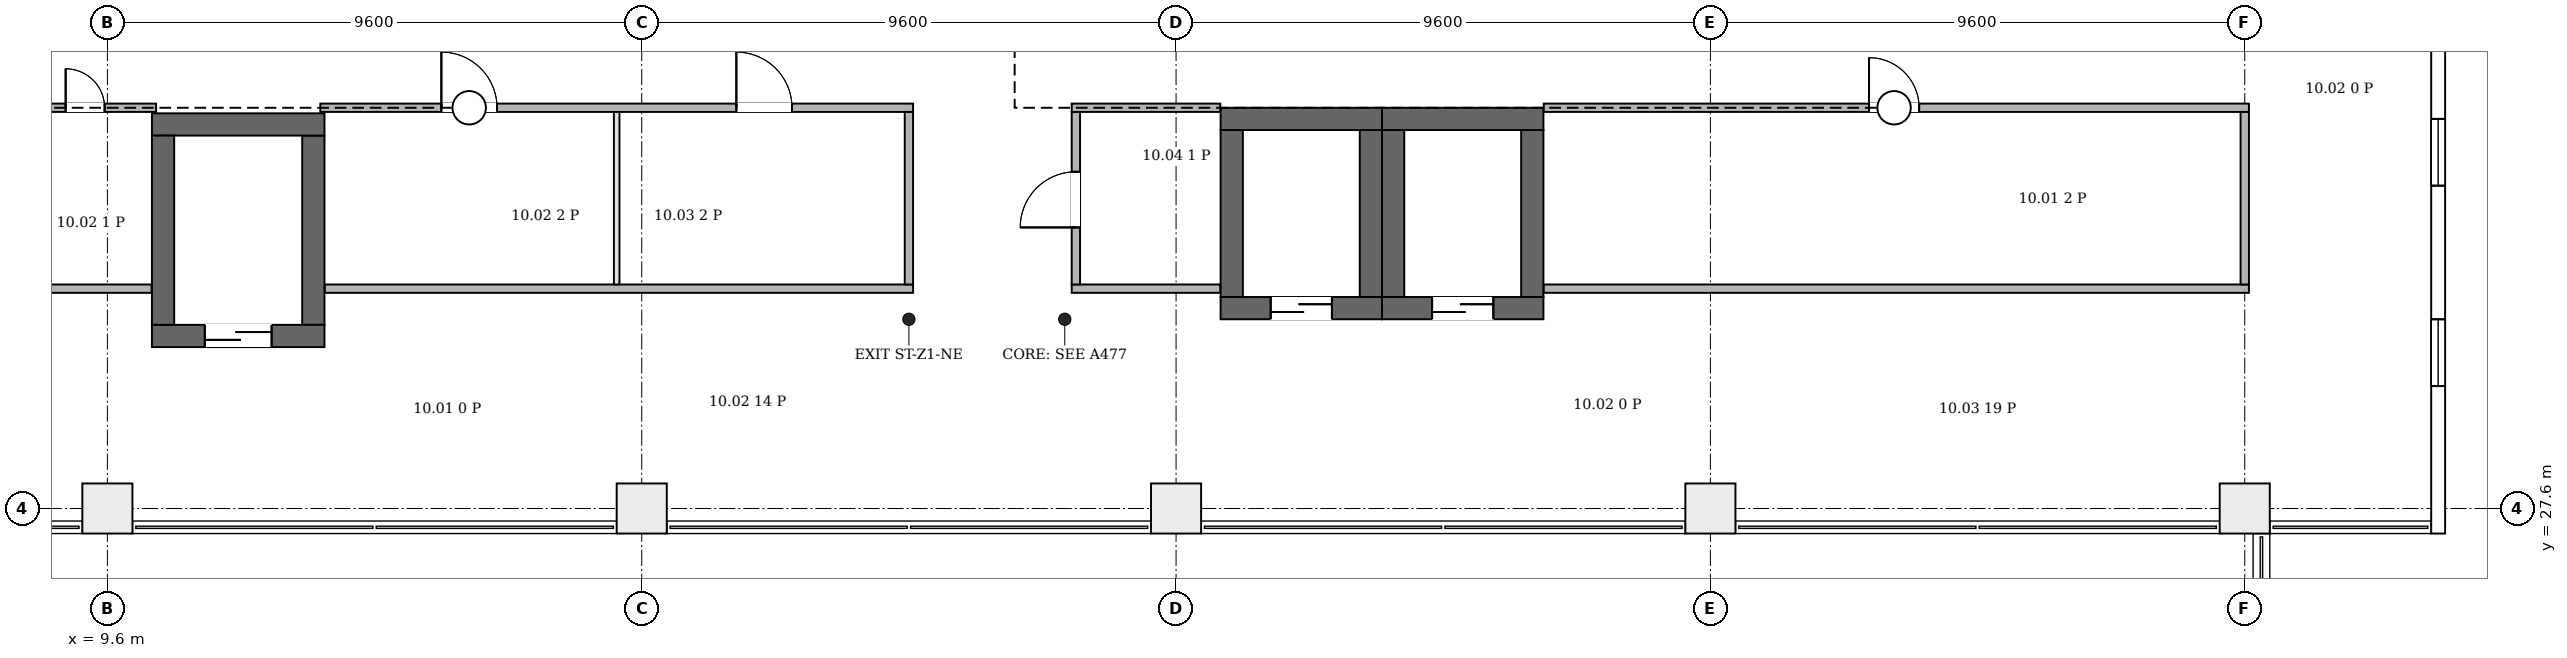
"""IFC4 building model, lengths in metres.
Left out: names, types, materials, properties, quantities, classifications, styles, units other than length and angle.
Written with IfcOpenShell. Run it as: python <this file> out.ifc"""

import sys

from ifc_helpers import new_model, si_unit, direction, frame, frame_2d, origin, origin_2d, place, context, subcontext, project, spatial, rectangle, extrude, element, fill, save


model = new_model("IFC4")
c1 = context("Model", 3, precision=1e-05, world=origin(), true_north=direction((0.0, 1.0)))
c2 = subcontext(c1, "Body", "Model", "MODEL_VIEW")
j1 = project(units=[si_unit("LENGTHUNIT", "METRE"), si_unit("PLANEANGLEUNIT", "RADIAN")], contexts=[c1])
p1 = place(None, origin())
s1 = spatial("IfcSite", under=j1, at=p1, CompositionType="ELEMENT")
p2 = place(p1, origin())
s2 = spatial("IfcBuilding", under=s1, at=p2, CompositionType="ELEMENT")
p3 = place(p2, frame((0.0, 0.0, 52.9)))
s3 = spatial("IfcBuildingStorey", under=s2, at=p3, CompositionType="ELEMENT", Elevation=52.9)
p4 = place(p3, frame((10.4, 30.7, 0.0), z_axis=(0.0, 0.0, 1.0), x_axis=(1.0, 0.0, 0.0)))
e1 = element("IfcWall", 1, at=p4, inside=s3, PredefinedType="SHEAR", context=c2, shape_type="SweptSolid", body=[
    extrude(rectangle(XDim=3.1, YDim=0.4, at=frame_2d((1.55, 0.0))), origin(), (0.0, 0.0, 1.0), 4.2),
])
p5 = place(p4, frame((0.95, 0.0, 0.0)))
e2 = element("IfcOpeningElement", 2, at=p5, cuts=e1, PredefinedType="OPENING", context=c2, shape_type="SweptSolid", body=[
    extrude(rectangle(XDim=1.2, YDim=2.1, at=frame_2d((0.6, 1.05))), frame((0.0, 0.21, 0.0), z_axis=(0.0, -1.0, 0.0), x_axis=(1.0, 0.0, 0.0)), (0.0, 0.0, 1.0), 0.42),
])
p6 = place(p3, frame((10.4, 34.5, 0.0), z_axis=(0.0, 0.0, 1.0), x_axis=(1.0, 0.0, 0.0)))
e3 = element("IfcWall", 3, at=p6, inside=s3, PredefinedType="SHEAR", context=c2, shape_type="SweptSolid", body=[
    extrude(rectangle(XDim=3.1, YDim=0.4, at=frame_2d((1.55, 0.0))), origin(), (0.0, 0.0, 1.0), 4.2),
])
for number, where, z_axis, x_axis in (
    (4, (10.6, 30.9, 0.0), (0.0, 0.0, 1.0), (0.0, 1.0, 0.0)),
    (5, (13.3, 30.9, 0.0), (0.0, 0.0, 1.0), (0.0, 1.0, 0.0)),
):
    element("IfcWall", number, at=place(p3, frame(where, z_axis=z_axis, x_axis=x_axis)), inside=s3, PredefinedType="SHEAR", context=c2, shape_type="SweptSolid", body=[
        extrude(rectangle(XDim=3.4, YDim=0.4, at=frame_2d((1.7, 0.0))), origin(), (0.0, 0.0, 1.0), 4.2),
    ])
p7 = place(p3, frame((29.6, 31.2, 0.0), z_axis=(0.0, 0.0, 1.0), x_axis=(1.0, 0.0, 0.0)))
e6 = element("IfcWall", 6, at=p7, inside=s3, PredefinedType="SHEAR", context=c2, shape_type="SweptSolid", body=[
    extrude(rectangle(XDim=2.9, YDim=0.4, at=frame_2d((1.45, 0.0))), origin(), (0.0, 0.0, 1.0), 4.2),
])
p8 = place(p7, frame((0.9, 0.0, 0.0)))
e7 = element("IfcOpeningElement", 7, at=p8, cuts=e6, PredefinedType="OPENING", context=c2, shape_type="SweptSolid", body=[
    extrude(rectangle(XDim=1.1, YDim=2.1, at=frame_2d((0.55, 1.05))), frame((0.0, 0.21, 0.0), z_axis=(0.0, -1.0, 0.0), x_axis=(1.0, 0.0, 0.0)), (0.0, 0.0, 1.0), 0.42),
])
p9 = place(p3, frame((29.6, 34.6, 0.0), z_axis=(0.0, 0.0, 1.0), x_axis=(1.0, 0.0, 0.0)))
e8 = element("IfcWall", 8, at=p9, inside=s3, PredefinedType="SHEAR", context=c2, shape_type="SweptSolid", body=[
    extrude(rectangle(XDim=2.9, YDim=0.4, at=frame_2d((1.45, 0.0))), origin(), (0.0, 0.0, 1.0), 4.2),
])
for number, where, z_axis, x_axis in (
    (9, (29.8, 31.4, 0.0), (0.0, 0.0, 1.0), (0.0, 1.0, 0.0)),
    (10, (32.3, 31.4, 0.0), (0.0, 0.0, 1.0), (0.0, 1.0, 0.0)),
):
    element("IfcWall", number, at=place(p3, frame(where, z_axis=z_axis, x_axis=x_axis)), inside=s3, PredefinedType="SHEAR", context=c2, shape_type="SweptSolid", body=[
        extrude(rectangle(XDim=3.0, YDim=0.4, at=frame_2d((1.5, 0.0))), origin(), (0.0, 0.0, 1.0), 4.2),
    ])
p10 = place(p3, frame((32.5, 31.2, 0.0), z_axis=(0.0, 0.0, 1.0), x_axis=(1.0, 0.0, 0.0)))
e11 = element("IfcWall", 11, at=p10, inside=s3, PredefinedType="SHEAR", context=c2, shape_type="SweptSolid", body=[
    extrude(rectangle(XDim=2.9, YDim=0.4, at=frame_2d((1.45, 0.0))), origin(), (0.0, 0.0, 1.0), 4.2),
])
p11 = place(p10, frame((0.9, 0.0, 0.0)))
e12 = element("IfcOpeningElement", 12, at=p11, cuts=e11, PredefinedType="OPENING", context=c2, shape_type="SweptSolid", body=[
    extrude(rectangle(XDim=1.1, YDim=2.1, at=frame_2d((0.55, 1.05))), frame((0.0, 0.21, 0.0), z_axis=(0.0, -1.0, 0.0), x_axis=(1.0, 0.0, 0.0)), (0.0, 0.0, 1.0), 0.42),
])
p12 = place(p3, frame((32.5, 34.6, 0.0), z_axis=(0.0, 0.0, 1.0), x_axis=(1.0, 0.0, 0.0)))
e13 = element("IfcWall", 13, at=p12, inside=s3, PredefinedType="SHEAR", context=c2, shape_type="SweptSolid", body=[
    extrude(rectangle(XDim=2.9, YDim=0.4, at=frame_2d((1.45, 0.0))), origin(), (0.0, 0.0, 1.0), 4.2),
])
for number, where, z_axis, x_axis in (
    (14, (32.7, 31.4, 0.0), (0.0, 0.0, 1.0), (0.0, 1.0, 0.0)),
    (15, (35.2, 31.4, 0.0), (0.0, 0.0, 1.0), (0.0, 1.0, 0.0)),
):
    element("IfcWall", number, at=place(p3, frame(where, z_axis=z_axis, x_axis=x_axis)), inside=s3, PredefinedType="SHEAR", context=c2, shape_type="SweptSolid", body=[
        extrude(rectangle(XDim=3.0, YDim=0.4, at=frame_2d((1.5, 0.0))), origin(), (0.0, 0.0, 1.0), 4.2),
    ])
for number, where, z_axis, x_axis in (
    (16, (9.6, 27.6, 0.0), (0.0, 0.0, 1.0), (1.0, 0.0, 0.0)),
    (17, (19.2, 27.6, 0.0), (0.0, 0.0, 1.0), (1.0, 0.0, 0.0)),
    (18, (28.8, 27.6, 0.0), (0.0, 0.0, 1.0), (1.0, 0.0, 0.0)),
    (19, (38.4, 27.6, 0.0), (0.0, 0.0, 1.0), (1.0, 0.0, 0.0)),
    (20, (48.0, 27.6, 0.0), (0.0, 0.0, 1.0), (1.0, 0.0, 0.0)),
):
    element("IfcColumn", number, at=place(p3, frame(where, z_axis=z_axis, x_axis=x_axis)), inside=s3, PredefinedType="COLUMN", context=c2, shape_type="SweptSolid", body=[
        extrude(rectangle(XDim=0.9, YDim=0.9, at=origin_2d()), origin(), (0.0, 0.0, 1.0), 4.2),
    ])
p13 = place(p3, frame((51.475, 27.15, 0.0), z_axis=(0.0, 0.0, 1.0), x_axis=(0.0, 1.0, 0.0)))
e21 = element("IfcWall", 21, at=p13, inside=s3, PredefinedType="ELEMENTEDWALL", context=c2, shape_type="SweptSolid", body=[
    extrude(rectangle(XDim=19.3, YDim=0.25, at=frame_2d((9.65, 0.0))), origin(), (0.0, 0.0, 1.0), 3.2),
])
p14 = place(p13, frame((2.65, 0.0, 0.6)))
e22 = element("IfcOpeningElement", 22, at=p14, cuts=e21, PredefinedType="OPENING", context=c2, shape_type="SweptSolid", body=[
    extrude(rectangle(XDim=1.2, YDim=2.5, at=frame_2d((0.6, 1.25))), frame((0.0, 0.135, 0.0), z_axis=(0.0, -1.0, 0.0), x_axis=(1.0, 0.0, 0.0)), (0.0, 0.0, 1.0), 0.27),
])
p15 = place(p13, frame((6.25, 0.0, 0.6)))
e23 = element("IfcOpeningElement", 23, at=p15, cuts=e21, PredefinedType="OPENING", context=c2, shape_type="SweptSolid", body=[
    extrude(rectangle(XDim=1.2, YDim=2.5, at=frame_2d((0.6, 1.25))), frame((0.0, 0.135, 0.0), z_axis=(0.0, -1.0, 0.0), x_axis=(1.0, 0.0, 0.0)), (0.0, 0.0, 1.0), 0.27),
])
p16 = place(p13, frame((11.85, 0.0, 0.6)))
e24 = element("IfcOpeningElement", 24, at=p16, cuts=e21, PredefinedType="OPENING", context=c2, shape_type="SweptSolid", body=[
    extrude(rectangle(XDim=1.2, YDim=2.5, at=frame_2d((0.6, 1.25))), frame((0.0, 0.135, 0.0), z_axis=(0.0, -1.0, 0.0), x_axis=(1.0, 0.0, 0.0)), (0.0, 0.0, 1.0), 0.27),
])
p17 = place(p13, frame((15.45, 0.0, 0.6)))
e25 = element("IfcOpeningElement", 25, at=p17, cuts=e21, PredefinedType="OPENING", context=c2, shape_type="SweptSolid", body=[
    extrude(rectangle(XDim=1.2, YDim=2.5, at=frame_2d((0.6, 1.25))), frame((0.0, 0.135, 0.0), z_axis=(0.0, -1.0, 0.0), x_axis=(1.0, 0.0, 0.0)), (0.0, 0.0, 1.0), 0.27),
])
p18 = place(p3, frame((0.056, 31.55, 0.0), z_axis=(0.0, 0.0, 1.0), x_axis=(1.0, 0.0, 0.0)))
e26 = element("IfcWall", 26, at=p18, inside=s3, PredefinedType="PARTITIONING", context=c2, shape_type="SweptSolid", body=[
    extrude(rectangle(XDim=10.338, YDim=0.15, at=frame_2d((5.169, 0.0))), origin(), (0.0, 0.0, 1.0), 3.9),
])
p19 = place(p3, frame((0.056, 34.8, 0.0), z_axis=(0.0, 0.0, 1.0), x_axis=(1.0, 0.0, 0.0)))
e27 = element("IfcWall", 27, at=p19, inside=s3, PredefinedType="PARTITIONING", context=c2, shape_type="SweptSolid", body=[
    extrude(rectangle(XDim=10.419, YDim=0.15, at=frame_2d((5.209, 0.0))), origin(), (0.0, 0.0, 1.0), 3.9),
])
p20 = place(p19, frame((0.794, 0.0, 0.0)))
e28 = element("IfcOpeningElement", 28, at=p20, cuts=e27, PredefinedType="OPENING", context=c2, shape_type="SweptSolid", body=[
    extrude(rectangle(XDim=0.8, YDim=2.1, at=frame_2d((0.4, 1.05))), frame((0.0, 0.085, 0.0), z_axis=(0.0, -1.0, 0.0), x_axis=(1.0, 0.0, 0.0)), (0.0, 0.0, 1.0), 0.17),
])
p21 = place(p19, frame((3.494, 0.0, 0.0)))
e29 = element("IfcOpeningElement", 29, at=p21, cuts=e27, PredefinedType="OPENING", context=c2, shape_type="SweptSolid", body=[
    extrude(rectangle(XDim=0.8, YDim=2.1, at=frame_2d((0.4, 1.05))), frame((0.0, 0.085, 0.0), z_axis=(0.0, -1.0, 0.0), x_axis=(1.0, 0.0, 0.0)), (0.0, 0.0, 1.0), 0.17),
])
p22 = place(p19, frame((6.194, 0.0, 0.0)))
e30 = element("IfcOpeningElement", 30, at=p22, cuts=e27, PredefinedType="OPENING", context=c2, shape_type="SweptSolid", body=[
    extrude(rectangle(XDim=0.9, YDim=2.1, at=frame_2d((0.45, 1.05))), frame((0.0, 0.085, 0.0), z_axis=(0.0, -1.0, 0.0), x_axis=(1.0, 0.0, 0.0)), (0.0, 0.0, 1.0), 0.17),
])
p23 = place(p19, frame((8.794, 0.0, 0.0)))
e31 = element("IfcOpeningElement", 31, at=p23, cuts=e27, PredefinedType="OPENING", context=c2, shape_type="SweptSolid", body=[
    extrude(rectangle(XDim=0.7, YDim=2.1, at=frame_2d((0.35, 1.05))), frame((0.0, 0.085, 0.0), z_axis=(0.0, -1.0, 0.0), x_axis=(1.0, 0.0, 0.0)), (0.0, 0.0, 1.0), 0.17),
])
p24 = place(p3, frame((13.425, 34.8, 0.0), z_axis=(0.0, 0.0, 1.0), x_axis=(1.0, 0.0, 0.0)))
e32 = element("IfcWall", 32, at=p24, inside=s3, PredefinedType="PARTITIONING", context=c2, shape_type="SweptSolid", body=[
    extrude(rectangle(XDim=10.65, YDim=0.15, at=frame_2d((5.325, 0.0))), origin(), (0.0, 0.0, 1.0), 3.9),
])
p25 = place(p24, frame((2.175, 0.0, 0.0)))
e33 = element("IfcOpeningElement", 33, at=p25, cuts=e32, PredefinedType="OPENING", context=c2, shape_type="SweptSolid", body=[
    extrude(rectangle(XDim=1.0, YDim=2.1, at=frame_2d((0.5, 1.05))), frame((0.0, 0.085, 0.0), z_axis=(0.0, -1.0, 0.0), x_axis=(1.0, 0.0, 0.0)), (0.0, 0.0, 1.0), 0.17),
])
p26 = place(p24, frame((7.475, 0.0, 0.0)))
e34 = element("IfcOpeningElement", 34, at=p26, cuts=e32, PredefinedType="OPENING", context=c2, shape_type="SweptSolid", body=[
    extrude(rectangle(XDim=1.0, YDim=2.1, at=frame_2d((0.5, 1.05))), frame((0.0, 0.085, 0.0), z_axis=(0.0, -1.0, 0.0), x_axis=(1.0, 0.0, 0.0)), (0.0, 0.0, 1.0), 0.17),
])
p27 = place(p3, frame((13.506, 31.55, 0.0), z_axis=(0.0, 0.0, 1.0), x_axis=(1.0, 0.0, 0.0)))
e35 = element("IfcWall", 35, at=p27, inside=s3, PredefinedType="PARTITIONING", context=c2, shape_type="SweptSolid", body=[
    extrude(rectangle(XDim=10.569, YDim=0.15, at=frame_2d((5.284, 0.0))), origin(), (0.0, 0.0, 1.0), 3.9),
])
p28 = place(p3, frame((18.75, 31.625, 0.0), z_axis=(0.0, 0.0, 1.0), x_axis=(0.0, 1.0, 0.0)))
e36 = element("IfcWall", 36, at=p28, inside=s3, PredefinedType="PARTITIONING", context=c2, shape_type="SweptSolid", body=[
    extrude(rectangle(XDim=3.1, YDim=0.1, at=frame_2d((1.55, 0.0))), origin(), (0.0, 0.0, 1.0), 3.9),
])
p29 = place(p3, frame((24.0, 31.625, 0.0), z_axis=(0.0, 0.0, 1.0), x_axis=(0.0, 1.0, 0.0)))
e37 = element("IfcWall", 37, at=p29, inside=s3, PredefinedType="PARTITIONING", context=c2, shape_type="SweptSolid", body=[
    extrude(rectangle(XDim=3.1, YDim=0.15, at=frame_2d((1.55, 0.0))), origin(), (0.0, 0.0, 1.0), 3.9),
])
p30 = place(p3, frame((26.925, 31.55, 0.0), z_axis=(0.0, 0.0, 1.0), x_axis=(1.0, 0.0, 0.0)))
e38 = element("IfcWall", 38, at=p30, inside=s3, PredefinedType="PARTITIONING", context=c2, shape_type="SweptSolid", body=[
    extrude(rectangle(XDim=2.669, YDim=0.15, at=frame_2d((1.334, 0.0))), origin(), (0.0, 0.0, 1.0), 3.9),
])
p31 = place(p3, frame((27.0, 31.625, 0.0), z_axis=(0.0, 0.0, 1.0), x_axis=(0.0, 1.0, 0.0)))
e39 = element("IfcWall", 39, at=p31, inside=s3, PredefinedType="PARTITIONING", context=c2, shape_type="SweptSolid", body=[
    extrude(rectangle(XDim=3.1, YDim=0.15, at=frame_2d((1.55, 0.0))), origin(), (0.0, 0.0, 1.0), 3.9),
])
p32 = place(p31, frame((1.025, 0.0, 0.0)))
e40 = element("IfcOpeningElement", 40, at=p32, cuts=e39, PredefinedType="OPENING", context=c2, shape_type="SweptSolid", body=[
    extrude(rectangle(XDim=1.0, YDim=2.1, at=frame_2d((0.5, 1.05))), frame((0.0, 0.085, 0.0), z_axis=(0.0, -1.0, 0.0), x_axis=(1.0, 0.0, 0.0)), (0.0, 0.0, 1.0), 0.17),
])
p33 = place(p3, frame((26.925, 34.8, 0.0), z_axis=(0.0, 0.0, 1.0), x_axis=(1.0, 0.0, 0.0)))
e41 = element("IfcWall", 41, at=p33, inside=s3, PredefinedType="PARTITIONING", context=c2, shape_type="SweptSolid", body=[
    extrude(rectangle(XDim=2.669, YDim=0.15, at=frame_2d((1.334, 0.0))), origin(), (0.0, 0.0, 1.0), 3.9),
])
p34 = place(p3, frame((35.406, 31.55, 0.0), z_axis=(0.0, 0.0, 1.0), x_axis=(1.0, 0.0, 0.0)))
e42 = element("IfcWall", 42, at=p34, inside=s3, PredefinedType="PARTITIONING", context=c2, shape_type="SweptSolid", body=[
    extrude(rectangle(XDim=12.669, YDim=0.15, at=frame_2d((6.334, 0.0))), origin(), (0.0, 0.0, 1.0), 3.9),
])
p35 = place(p3, frame((35.406, 34.8, 0.0), z_axis=(0.0, 0.0, 1.0), x_axis=(1.0, 0.0, 0.0)))
e43 = element("IfcWall", 43, at=p35, inside=s3, PredefinedType="PARTITIONING", context=c2, shape_type="SweptSolid", body=[
    extrude(rectangle(XDim=12.669, YDim=0.15, at=frame_2d((6.334, 0.0))), origin(), (0.0, 0.0, 1.0), 3.9),
])
p36 = place(p35, frame((5.844, 0.0, 0.0)))
e44 = element("IfcOpeningElement", 44, at=p36, cuts=e43, PredefinedType="OPENING", context=c2, shape_type="SweptSolid", body=[
    extrude(rectangle(XDim=0.9, YDim=2.1, at=frame_2d((0.45, 1.05))), frame((0.0, 0.085, 0.0), z_axis=(0.0, -1.0, 0.0), x_axis=(1.0, 0.0, 0.0)), (0.0, 0.0, 1.0), 0.17),
])
p37 = place(p3, frame((48.0, 31.625, 0.0), z_axis=(0.0, 0.0, 1.0), x_axis=(0.0, 1.0, 0.0)))
e45 = element("IfcWall", 45, at=p37, inside=s3, PredefinedType="PARTITIONING", context=c2, shape_type="SweptSolid", body=[
    extrude(rectangle(XDim=3.1, YDim=0.15, at=frame_2d((1.55, 0.0))), origin(), (0.0, 0.0, 1.0), 3.3),
])
p38 = place(p14, origin())
e46 = element("IfcWindow", 46, at=p38, inside=s3, PartitioningType="SINGLE_PANEL", PredefinedType="WINDOW", context=c2, shape_type="SweptSolid", body=[
    extrude(rectangle(XDim=1.2, YDim=2.5, at=frame_2d((0.6, 1.25))), frame((0.0, 0.03, 0.0), z_axis=(0.0, -1.0, 0.0), x_axis=(1.0, 0.0, 0.0)), (0.0, 0.0, 1.0), 0.06),
])
fill(e22, e46)
p39 = place(p15, origin())
e47 = element("IfcWindow", 47, at=p39, inside=s3, PartitioningType="SINGLE_PANEL", PredefinedType="WINDOW", context=c2, shape_type="SweptSolid", body=[
    extrude(rectangle(XDim=1.2, YDim=2.5, at=frame_2d((0.6, 1.25))), frame((0.0, 0.03, 0.0), z_axis=(0.0, -1.0, 0.0), x_axis=(1.0, 0.0, 0.0)), (0.0, 0.0, 1.0), 0.06),
])
fill(e23, e47)
p40 = place(p5, origin())
e48 = element("IfcDoor", 48, at=p40, inside=s3, OperationType="DOUBLE_DOOR_SLIDING", PredefinedType="DOOR", context=c2, shape_type="SweptSolid", body=[
    extrude(rectangle(XDim=1.2, YDim=2.1, at=frame_2d((0.6, 1.05))), frame((0.0, 0.025, 0.0), z_axis=(0.0, -1.0, 0.0), x_axis=(1.0, 0.0, 0.0)), (0.0, 0.0, 1.0), 0.05),
])
fill(e2, e48)
p41 = place(p8, origin())
e49 = element("IfcDoor", 49, at=p41, inside=s3, OperationType="DOUBLE_DOOR_SLIDING", PredefinedType="DOOR", context=c2, shape_type="SweptSolid", body=[
    extrude(rectangle(XDim=1.1, YDim=2.1, at=frame_2d((0.55, 1.05))), frame((0.0, 0.025, 0.0), z_axis=(0.0, -1.0, 0.0), x_axis=(1.0, 0.0, 0.0)), (0.0, 0.0, 1.0), 0.05),
])
fill(e7, e49)
p42 = place(p11, origin())
e50 = element("IfcDoor", 50, at=p42, inside=s3, OperationType="DOUBLE_DOOR_SLIDING", PredefinedType="DOOR", context=c2, shape_type="SweptSolid", body=[
    extrude(rectangle(XDim=1.1, YDim=2.1, at=frame_2d((0.55, 1.05))), frame((0.0, 0.025, 0.0), z_axis=(0.0, -1.0, 0.0), x_axis=(1.0, 0.0, 0.0)), (0.0, 0.0, 1.0), 0.05),
])
fill(e12, e50)
p43 = place(p23, origin())
e51 = element("IfcDoor", 51, at=p43, inside=s3, OperationType="SINGLE_SWING_LEFT", PredefinedType="DOOR", context=c2, shape_type="SweptSolid", body=[
    extrude(rectangle(XDim=0.7, YDim=2.1, at=frame_2d((0.35, 1.05))), frame((0.0, 0.025, 0.0), z_axis=(0.0, -1.0, 0.0), x_axis=(1.0, 0.0, 0.0)), (0.0, 0.0, 1.0), 0.05),
])
fill(e31, e51)
p44 = place(p25, origin())
e52 = element("IfcDoor", 52, at=p44, inside=s3, OperationType="SINGLE_SWING_RIGHT", PredefinedType="DOOR", context=c2, shape_type="SweptSolid", body=[
    extrude(rectangle(XDim=1.0, YDim=2.1, at=frame_2d((0.5, 1.05))), frame((0.0, 0.025, 0.0), z_axis=(0.0, -1.0, 0.0), x_axis=(1.0, 0.0, 0.0)), (0.0, 0.0, 1.0), 0.05),
])
fill(e33, e52)
p45 = place(p26, origin())
e53 = element("IfcDoor", 53, at=p45, inside=s3, OperationType="SINGLE_SWING_RIGHT", PredefinedType="DOOR", context=c2, shape_type="SweptSolid", body=[
    extrude(rectangle(XDim=1.0, YDim=2.1, at=frame_2d((0.5, 1.05))), frame((0.0, 0.025, 0.0), z_axis=(0.0, -1.0, 0.0), x_axis=(1.0, 0.0, 0.0)), (0.0, 0.0, 1.0), 0.05),
])
fill(e34, e53)
p46 = place(p32, origin())
e54 = element("IfcDoor", 54, at=p46, inside=s3, OperationType="SINGLE_SWING_LEFT", PredefinedType="DOOR", context=c2, shape_type="SweptSolid", body=[
    extrude(rectangle(XDim=1.0, YDim=2.1, at=frame_2d((0.5, 1.05))), frame((0.0, 0.025, 0.0), z_axis=(0.0, -1.0, 0.0), x_axis=(1.0, 0.0, 0.0)), (0.0, 0.0, 1.0), 0.05),
])
fill(e40, e54)
p47 = place(p36, origin())
e55 = element("IfcDoor", 55, at=p47, inside=s3, OperationType="SINGLE_SWING_RIGHT", PredefinedType="DOOR", context=c2, shape_type="SweptSolid", body=[
    extrude(rectangle(XDim=0.9, YDim=2.1, at=frame_2d((0.45, 1.05))), frame((0.0, 0.025, 0.0), z_axis=(0.0, -1.0, 0.0), x_axis=(1.0, 0.0, 0.0)), (0.0, 0.0, 1.0), 0.05),
])
fill(e44, e55)
save(model, sys.argv[1])
